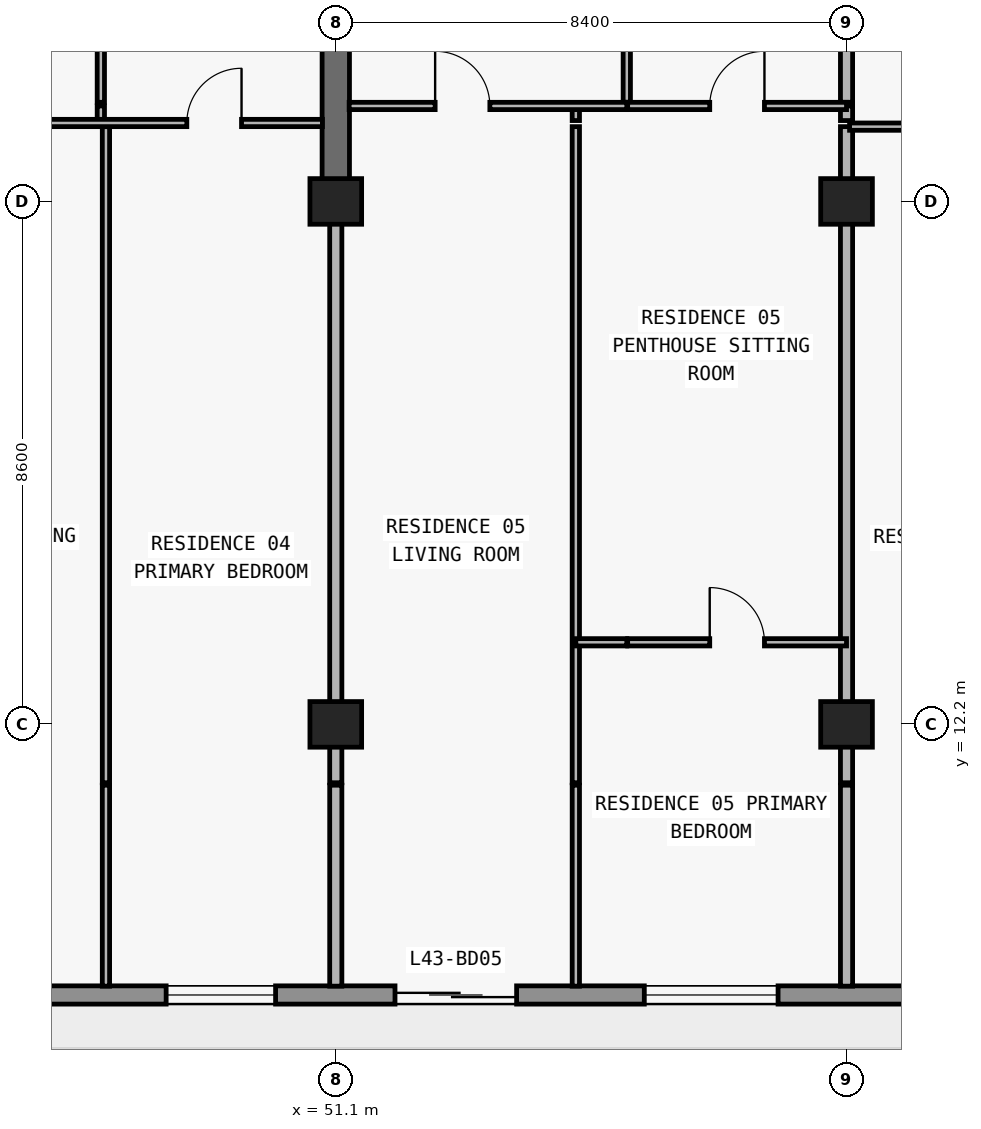
"""IFC4 building model, lengths in metres.
Left out: names, types, materials, properties, quantities, classifications, styles, units other than length and angle.
Written with IfcOpenShell. Run it as: python <this file> out.ifc"""

import sys

from ifc_helpers import new_model, si_unit, direction, frame, frame_2d, origin, origin_2d, place, context, subcontext, project, spatial, rectangle, extrude, element, fill, save


model = new_model("IFC4")
c1 = context("Model", 3, precision=1e-05, world=origin(), true_north=direction((0.0, 1.0)))
c2 = subcontext(c1, "Body", "Model", "MODEL_VIEW")
j1 = project(units=[si_unit("LENGTHUNIT", "METRE"), si_unit("PLANEANGLEUNIT", "RADIAN")], contexts=[c1])
p1 = place(None, origin())
s1 = spatial("IfcSite", under=j1, at=p1, CompositionType="ELEMENT")
p2 = place(p1, origin())
s2 = spatial("IfcBuilding", under=s1, at=p2, CompositionType="ELEMENT")
p3 = place(p2, frame((0.0, 0.0, 157.2)))
s3 = spatial("IfcBuildingStorey", under=s2, at=p3, CompositionType="ELEMENT", Elevation=157.2)
for number, where, z_axis, x_axis in (
    (1, (51.1, 12.2, 0.0), (0.0, 0.0, 1.0), (1.0, 0.0, 0.0)),
    (2, (59.5, 12.2, 0.0), (0.0, 0.0, 1.0), (1.0, 0.0, 0.0)),
    (3, (51.1, 20.8, 0.0), (0.0, 0.0, 1.0), (1.0, 0.0, 0.0)),
    (4, (59.5, 20.8, 0.0), (0.0, 0.0, 1.0), (1.0, 0.0, 0.0)),
):
    element("IfcColumn", number, at=place(p3, frame(where, z_axis=z_axis, x_axis=x_axis)), inside=s3, PredefinedType="COLUMN", context=c2, shape_type="SweptSolid", body=[
        extrude(rectangle(XDim=0.85, YDim=0.75, at=origin_2d()), origin(), (0.0, 0.0, 1.0), 3.05),
    ])
p4 = place(p3, frame((51.1, 20.8, 0.0), z_axis=(0.0, 0.0, 1.0), x_axis=(0.0, 1.0, 0.0)))
e5 = element("IfcWall", 5, at=p4, inside=s3, PredefinedType="SHEAR", context=c2, shape_type="SweptSolid", body=[
    extrude(rectangle(XDim=8.6, YDim=0.45, at=frame_2d((4.3, 0.0))), origin(), (0.0, 0.0, 1.0), 3.05),
])
p5 = place(p3, frame((67.7, 7.75, 0.0), z_axis=(0.0, 0.0, 1.0), x_axis=(-1.0, 0.0, 0.0)))
e6 = element("IfcWall", 6, at=p5, inside=s3, PredefinedType="STANDARD", context=c2, shape_type="SweptSolid", body=[
    extrude(rectangle(XDim=57.6, YDim=0.3, at=frame_2d((28.8, 0.0))), origin(), (0.0, 0.0, 1.0), 3.05),
])
p6 = place(p5, frame((54.673, 0.0, 0.0)))
e7 = element("IfcOpeningElement", 7, at=p6, cuts=e6, PredefinedType="OPENING", context=c2, shape_type="SweptSolid", body=[
    extrude(rectangle(XDim=2.0, YDim=2.3, at=frame_2d((1.0, 1.15))), frame((0.0, 0.16, 0.0), z_axis=(0.0, -1.0, 0.0), x_axis=(1.0, 0.0, 0.0)), (0.0, 0.0, 1.0), 0.32),
])
p7 = place(p5, frame((50.473, 0.0, 0.85)))
e8 = element("IfcOpeningElement", 8, at=p7, cuts=e6, PredefinedType="OPENING", context=c2, shape_type="SweptSolid", body=[
    extrude(rectangle(XDim=2.2, YDim=1.55, at=frame_2d((1.1, 0.775))), frame((0.0, 0.16, 0.0), z_axis=(0.0, -1.0, 0.0), x_axis=(1.0, 0.0, 0.0)), (0.0, 0.0, 1.0), 0.32),
])
p8 = place(p5, frame((46.09, 0.0, 0.0)))
e9 = element("IfcOpeningElement", 9, at=p8, cuts=e6, PredefinedType="OPENING", context=c2, shape_type="SweptSolid", body=[
    extrude(rectangle(XDim=2.0, YDim=2.3, at=frame_2d((1.0, 1.15))), frame((0.0, 0.16, 0.0), z_axis=(0.0, -1.0, 0.0), x_axis=(1.0, 0.0, 0.0)), (0.0, 0.0, 1.0), 0.32),
])
p9 = place(p5, frame((41.99, 0.0, 0.85)))
e10 = element("IfcOpeningElement", 10, at=p9, cuts=e6, PredefinedType="OPENING", context=c2, shape_type="SweptSolid", body=[
    extrude(rectangle(XDim=1.8, YDim=1.55, at=frame_2d((0.9, 0.775))), frame((0.0, 0.16, 0.0), z_axis=(0.0, -1.0, 0.0), x_axis=(1.0, 0.0, 0.0)), (0.0, 0.0, 1.0), 0.32),
])
p10 = place(p5, frame((38.09, 0.0, 0.0)))
e11 = element("IfcOpeningElement", 11, at=p10, cuts=e6, PredefinedType="OPENING", context=c2, shape_type="SweptSolid", body=[
    extrude(rectangle(XDim=2.0, YDim=2.3, at=frame_2d((1.0, 1.15))), frame((0.0, 0.16, 0.0), z_axis=(0.0, -1.0, 0.0), x_axis=(1.0, 0.0, 0.0)), (0.0, 0.0, 1.0), 0.32),
])
p11 = place(p5, frame((33.41, 0.0, 0.65)))
e12 = element("IfcOpeningElement", 12, at=p11, cuts=e6, PredefinedType="OPENING", context=c2, shape_type="SweptSolid", body=[
    extrude(rectangle(XDim=2.6, YDim=1.85, at=frame_2d((1.3, 0.925))), frame((0.0, 0.16, 0.0), z_axis=(0.0, -1.0, 0.0), x_axis=(1.0, 0.0, 0.0)), (0.0, 0.0, 1.0), 0.32),
])
p12 = place(p5, frame((27.7, 0.0, 0.85)))
e13 = element("IfcOpeningElement", 13, at=p12, cuts=e6, PredefinedType="OPENING", context=c2, shape_type="SweptSolid", body=[
    extrude(rectangle(XDim=2.2, YDim=1.55, at=frame_2d((1.1, 0.775))), frame((0.0, 0.16, 0.0), z_axis=(0.0, -1.0, 0.0), x_axis=(1.0, 0.0, 0.0)), (0.0, 0.0, 1.0), 0.32),
])
p13 = place(p5, frame((21.69, 0.0, 0.0)))
e14 = element("IfcOpeningElement", 14, at=p13, cuts=e6, PredefinedType="OPENING", context=c2, shape_type="SweptSolid", body=[
    extrude(rectangle(XDim=2.0, YDim=2.3, at=frame_2d((1.0, 1.15))), frame((0.0, 0.16, 0.0), z_axis=(0.0, -1.0, 0.0), x_axis=(1.0, 0.0, 0.0)), (0.0, 0.0, 1.0), 0.32),
])
p14 = place(p5, frame((17.59, 0.0, 0.85)))
e15 = element("IfcOpeningElement", 15, at=p14, cuts=e6, PredefinedType="OPENING", context=c2, shape_type="SweptSolid", body=[
    extrude(rectangle(XDim=1.8, YDim=1.55, at=frame_2d((0.9, 0.775))), frame((0.0, 0.16, 0.0), z_axis=(0.0, -1.0, 0.0), x_axis=(1.0, 0.0, 0.0)), (0.0, 0.0, 1.0), 0.32),
])
p15 = place(p5, frame((13.626, 0.0, 0.0)))
e16 = element("IfcOpeningElement", 16, at=p15, cuts=e6, PredefinedType="OPENING", context=c2, shape_type="SweptSolid", body=[
    extrude(rectangle(XDim=2.0, YDim=2.3, at=frame_2d((1.0, 1.15))), frame((0.0, 0.16, 0.0), z_axis=(0.0, -1.0, 0.0), x_axis=(1.0, 0.0, 0.0)), (0.0, 0.0, 1.0), 0.32),
])
p16 = place(p5, frame((9.326, 0.0, 0.85)))
e17 = element("IfcOpeningElement", 17, at=p16, cuts=e6, PredefinedType="OPENING", context=c2, shape_type="SweptSolid", body=[
    extrude(rectangle(XDim=2.2, YDim=1.55, at=frame_2d((1.1, 0.775))), frame((0.0, 0.16, 0.0), z_axis=(0.0, -1.0, 0.0), x_axis=(1.0, 0.0, 0.0)), (0.0, 0.0, 1.0), 0.32),
])
p17 = place(p5, frame((4.945, 0.0, 0.0)))
e18 = element("IfcOpeningElement", 18, at=p17, cuts=e6, PredefinedType="OPENING", context=c2, shape_type="SweptSolid", body=[
    extrude(rectangle(XDim=2.0, YDim=2.3, at=frame_2d((1.0, 1.15))), frame((0.0, 0.16, 0.0), z_axis=(0.0, -1.0, 0.0), x_axis=(1.0, 0.0, 0.0)), (0.0, 0.0, 1.0), 0.32),
])
p18 = place(p5, frame((0.945, 0.0, 0.85)))
e19 = element("IfcOpeningElement", 19, at=p18, cuts=e6, PredefinedType="OPENING", context=c2, shape_type="SweptSolid", body=[
    extrude(rectangle(XDim=1.8, YDim=1.55, at=frame_2d((0.9, 0.775))), frame((0.0, 0.16, 0.0), z_axis=(0.0, -1.0, 0.0), x_axis=(1.0, 0.0, 0.0)), (0.0, 0.0, 1.0), 0.32),
])
p19 = place(p3, frame((47.236, 22.13, 0.0), z_axis=(0.0, 0.0, 1.0), x_axis=(0.0, 1.0, 0.0)))
e20 = element("IfcWall", 20, at=p19, inside=s3, PredefinedType="PARTITIONING", context=c2, shape_type="SweptSolid", body=[
    extrude(rectangle(XDim=0.24, YDim=0.12, at=frame_2d((0.12, 0.0))), origin(), (0.0, 0.0, 1.0), 3.05),
])
p20 = place(p3, frame((47.236, 22.43, 0.0), z_axis=(0.0, 0.0, 1.0), x_axis=(0.0, 1.0, 0.0)))
e21 = element("IfcWall", 21, at=p20, inside=s3, PredefinedType="PARTITIONING", context=c2, shape_type="SweptSolid", body=[
    extrude(rectangle(XDim=4.75, YDim=0.12, at=frame_2d((2.375, 0.0))), origin(), (0.0, 0.0, 1.0), 3.05),
])
p21 = place(p20, frame((1.925, 0.0, 0.0)))
e22 = element("IfcOpeningElement", 22, at=p21, cuts=e21, PredefinedType="OPENING", context=c2, shape_type="SweptSolid", body=[
    extrude(rectangle(XDim=0.9, YDim=2.15, at=frame_2d((0.45, 1.075))), frame((0.0, 0.07, 0.0), z_axis=(0.0, -1.0, 0.0), x_axis=(1.0, 0.0, 0.0)), (0.0, 0.0, 1.0), 0.14),
])
p22 = place(p3, frame((47.32, 7.895, 0.0), z_axis=(0.0, 0.0, 1.0), x_axis=(0.0, 1.0, 0.0)))
e23 = element("IfcWall", 23, at=p22, inside=s3, PredefinedType="PARTITIONING", context=c2, shape_type="SweptSolid", body=[
    extrude(rectangle(XDim=3.305, YDim=0.12, at=frame_2d((1.652, 0.0))), origin(), (0.0, 0.0, 1.0), 3.05),
])
p23 = place(p3, frame((47.32, 11.24, 0.0), z_axis=(0.0, 0.0, 1.0), x_axis=(0.0, 1.0, 0.0)))
e24 = element("IfcWall", 24, at=p23, inside=s3, PredefinedType="PARTITIONING", context=c2, shape_type="SweptSolid", body=[
    extrude(rectangle(XDim=10.79, YDim=0.12, at=frame_2d((5.395, 0.0))), origin(), (0.0, 0.0, 1.0), 3.05),
])
p24 = place(p3, frame((51.1, 7.895, 0.0), z_axis=(0.0, 0.0, 1.0), x_axis=(0.0, 1.0, 0.0)))
e25 = element("IfcWall", 25, at=p24, inside=s3, PredefinedType="PARTITIONING", context=c2, shape_type="SweptSolid", body=[
    extrude(rectangle(XDim=3.305, YDim=0.2, at=frame_2d((1.652, 0.0))), origin(), (0.0, 0.0, 1.0), 3.05),
])
p25 = place(p3, frame((51.1, 11.24, 0.0), z_axis=(0.0, 0.0, 1.0), x_axis=(0.0, 1.0, 0.0)))
e26 = element("IfcWall", 26, at=p25, inside=s3, PredefinedType="PARTITIONING", context=c2, shape_type="SweptSolid", body=[
    extrude(rectangle(XDim=9.555, YDim=0.2, at=frame_2d((4.777, 0.0))), origin(), (0.0, 0.0, 1.0), 2.263),
])
p26 = place(p3, frame((55.048, 7.895, 0.0), z_axis=(0.0, 0.0, 1.0), x_axis=(0.0, 1.0, 0.0)))
e27 = element("IfcWall", 27, at=p26, inside=s3, PredefinedType="PARTITIONING", context=c2, shape_type="SweptSolid", body=[
    extrude(rectangle(XDim=3.305, YDim=0.12, at=frame_2d((1.652, 0.0))), origin(), (0.0, 0.0, 1.0), 3.05),
])
p27 = place(p3, frame((55.048, 11.24, 0.0), z_axis=(0.0, 0.0, 1.0), x_axis=(0.0, 1.0, 0.0)))
e28 = element("IfcWall", 28, at=p27, inside=s3, PredefinedType="PARTITIONING", context=c2, shape_type="SweptSolid", body=[
    extrude(rectangle(XDim=10.79, YDim=0.12, at=frame_2d((5.395, 0.0))), origin(), (0.0, 0.0, 1.0), 3.05),
])
p28 = place(p3, frame((55.048, 22.13, 0.0), z_axis=(0.0, 0.0, 1.0), x_axis=(0.0, 1.0, 0.0)))
e29 = element("IfcWall", 29, at=p28, inside=s3, PredefinedType="PARTITIONING", context=c2, shape_type="SweptSolid", body=[
    extrude(rectangle(XDim=0.24, YDim=0.12, at=frame_2d((0.12, 0.0))), origin(), (0.0, 0.0, 1.0), 3.05),
])
p29 = place(p3, frame((55.886, 22.43, 0.0), z_axis=(0.0, 0.0, 1.0), x_axis=(0.0, 1.0, 0.0)))
e30 = element("IfcWall", 30, at=p29, inside=s3, PredefinedType="PARTITIONING", context=c2, shape_type="SweptSolid", body=[
    extrude(rectangle(XDim=4.75, YDim=0.12, at=frame_2d((2.375, 0.0))), origin(), (0.0, 0.0, 1.0), 3.05),
])
p30 = place(p29, frame((1.925, 0.0, 0.0)))
e31 = element("IfcOpeningElement", 31, at=p30, cuts=e30, PredefinedType="OPENING", context=c2, shape_type="SweptSolid", body=[
    extrude(rectangle(XDim=0.9, YDim=2.15, at=frame_2d((0.45, 1.075))), frame((0.0, 0.07, 0.0), z_axis=(0.0, -1.0, 0.0), x_axis=(1.0, 0.0, 0.0)), (0.0, 0.0, 1.0), 0.14),
])
p31 = place(p3, frame((59.5, 7.895, 0.0), z_axis=(0.0, 0.0, 1.0), x_axis=(0.0, 1.0, 0.0)))
e32 = element("IfcWall", 32, at=p31, inside=s3, PredefinedType="PARTITIONING", context=c2, shape_type="SweptSolid", body=[
    extrude(rectangle(XDim=3.305, YDim=0.2, at=frame_2d((1.652, 0.0))), origin(), (0.0, 0.0, 1.0), 3.05),
])
p32 = place(p3, frame((59.5, 11.24, 0.0), z_axis=(0.0, 0.0, 1.0), x_axis=(0.0, 1.0, 0.0)))
e33 = element("IfcWall", 33, at=p32, inside=s3, PredefinedType="PARTITIONING", context=c2, shape_type="SweptSolid", body=[
    extrude(rectangle(XDim=10.79, YDim=0.2, at=frame_2d((5.395, 0.0))), origin(), (0.0, 0.0, 1.0), 2.263),
])
p33 = place(p3, frame((59.5, 22.13, 0.0), z_axis=(0.0, 0.0, 1.0), x_axis=(0.0, 1.0, 0.0)))
e34 = element("IfcWall", 34, at=p33, inside=s3, PredefinedType="PARTITIONING", context=c2, shape_type="SweptSolid", body=[
    extrude(rectangle(XDim=0.24, YDim=0.2, at=frame_2d((0.12, 0.0))), origin(), (0.0, 0.0, 1.0), 2.263),
])
p34 = place(p3, frame((59.5, 22.43, 0.0), z_axis=(0.0, 0.0, 1.0), x_axis=(0.0, 1.0, 0.0)))
e35 = element("IfcWall", 35, at=p34, inside=s3, PredefinedType="PARTITIONING", context=c2, shape_type="SweptSolid", body=[
    extrude(rectangle(XDim=4.75, YDim=0.2, at=frame_2d((2.375, 0.0))), origin(), (0.0, 0.0, 1.0), 2.263),
])
p35 = place(p3, frame((55.048, 13.55, 0.0), z_axis=(0.0, 0.0, 1.0), x_axis=(1.0, 0.0, 0.0)))
e36 = element("IfcWall", 36, at=p35, inside=s3, PredefinedType="PARTITIONING", context=c2, shape_type="SweptSolid", body=[
    extrude(rectangle(XDim=0.838, YDim=0.12, at=frame_2d((0.419, 0.0))), origin(), (0.0, 0.0, 1.0), 3.05),
])
p36 = place(p3, frame((55.9, 13.55, 0.0), z_axis=(0.0, 0.0, 1.0), x_axis=(1.0, 0.0, 0.0)))
e37 = element("IfcWall", 37, at=p36, inside=s3, PredefinedType="PARTITIONING", context=c2, shape_type="SweptSolid", body=[
    extrude(rectangle(XDim=3.6, YDim=0.12, at=frame_2d((1.8, 0.0))), origin(), (0.0, 0.0, 1.0), 3.05),
])
p37 = place(p36, frame((1.35, 0.0, 0.0)))
e38 = element("IfcOpeningElement", 38, at=p37, cuts=e37, PredefinedType="OPENING", context=c2, shape_type="SweptSolid", body=[
    extrude(rectangle(XDim=0.9, YDim=2.15, at=frame_2d((0.45, 1.075))), frame((0.0, 0.07, 0.0), z_axis=(0.0, -1.0, 0.0), x_axis=(1.0, 0.0, 0.0)), (0.0, 0.0, 1.0), 0.14),
])
p38 = place(p3, frame((59.55, 22.03, 0.0), z_axis=(0.0, 0.0, 1.0), x_axis=(1.0, 0.0, 0.0)))
e39 = element("IfcWall", 39, at=p38, inside=s3, PredefinedType="PARTITIONING", context=c2, shape_type="SweptSolid", body=[
    extrude(rectangle(XDim=8.15, YDim=0.12, at=frame_2d((4.075, 0.0))), origin(), (0.0, 0.0, 1.0), 3.05),
])
p39 = place(p38, frame((1.614, 0.0, 0.0)))
e40 = element("IfcOpeningElement", 40, at=p39, cuts=e39, PredefinedType="OPENING", context=c2, shape_type="SweptSolid", body=[
    extrude(rectangle(XDim=0.9, YDim=2.15, at=frame_2d((0.45, 1.075))), frame((0.0, 0.07, 0.0), z_axis=(0.0, -1.0, 0.0), x_axis=(1.0, 0.0, 0.0)), (0.0, 0.0, 1.0), 0.14),
])
p40 = place(p38, frame((5.855, 0.0, 0.0)))
e41 = element("IfcOpeningElement", 41, at=p40, cuts=e39, PredefinedType="OPENING", context=c2, shape_type="SweptSolid", body=[
    extrude(rectangle(XDim=0.9, YDim=2.15, at=frame_2d((0.45, 1.075))), frame((0.0, 0.07, 0.0), z_axis=(0.0, -1.0, 0.0), x_axis=(1.0, 0.0, 0.0)), (0.0, 0.0, 1.0), 0.14),
])
p41 = place(p3, frame((42.7, 22.09, 0.0), z_axis=(0.0, 0.0, 1.0), x_axis=(1.0, 0.0, 0.0)))
e42 = element("IfcWall", 42, at=p41, inside=s3, PredefinedType="PARTITIONING", context=c2, shape_type="SweptSolid", body=[
    extrude(rectangle(XDim=8.18, YDim=0.12, at=frame_2d((4.09, 0.0))), origin(), (0.0, 0.0, 1.0), 3.05),
])
p42 = place(p41, frame((1.818, 0.0, 0.0)))
e43 = element("IfcOpeningElement", 43, at=p42, cuts=e42, PredefinedType="OPENING", context=c2, shape_type="SweptSolid", body=[
    extrude(rectangle(XDim=0.9, YDim=2.15, at=frame_2d((0.45, 1.075))), frame((0.0, 0.07, 0.0), z_axis=(0.0, -1.0, 0.0), x_axis=(1.0, 0.0, 0.0)), (0.0, 0.0, 1.0), 0.14),
])
p43 = place(p41, frame((5.95, 0.0, 0.0)))
e44 = element("IfcOpeningElement", 44, at=p43, cuts=e42, PredefinedType="OPENING", context=c2, shape_type="SweptSolid", body=[
    extrude(rectangle(XDim=0.9, YDim=2.15, at=frame_2d((0.45, 1.075))), frame((0.0, 0.07, 0.0), z_axis=(0.0, -1.0, 0.0), x_axis=(1.0, 0.0, 0.0)), (0.0, 0.0, 1.0), 0.14),
])
p44 = place(p3, frame((51.32, 22.37, 0.0), z_axis=(0.0, 0.0, 1.0), x_axis=(1.0, 0.0, 0.0)))
e45 = element("IfcWall", 45, at=p44, inside=s3, PredefinedType="PARTITIONING", context=c2, shape_type="SweptSolid", body=[
    extrude(rectangle(XDim=4.566, YDim=0.12, at=frame_2d((2.283, 0.0))), origin(), (0.0, 0.0, 1.0), 3.05),
])
p45 = place(p44, frame((1.414, 0.0, 0.0)))
e46 = element("IfcOpeningElement", 46, at=p45, cuts=e45, PredefinedType="OPENING", context=c2, shape_type="SweptSolid", body=[
    extrude(rectangle(XDim=0.9, YDim=2.15, at=frame_2d((0.45, 1.075))), frame((0.0, 0.07, 0.0), z_axis=(0.0, -1.0, 0.0), x_axis=(1.0, 0.0, 0.0)), (0.0, 0.0, 1.0), 0.14),
])
p46 = place(p3, frame((55.9, 22.37, 0.0), z_axis=(0.0, 0.0, 1.0), x_axis=(1.0, 0.0, 0.0)))
e47 = element("IfcWall", 47, at=p46, inside=s3, PredefinedType="PARTITIONING", context=c2, shape_type="SweptSolid", body=[
    extrude(rectangle(XDim=3.6, YDim=0.12, at=frame_2d((1.8, 0.0))), origin(), (0.0, 0.0, 1.0), 3.05),
])
p47 = place(p46, frame((1.35, 0.0, 0.0)))
e48 = element("IfcOpeningElement", 48, at=p47, cuts=e47, PredefinedType="OPENING", context=c2, shape_type="SweptSolid", body=[
    extrude(rectangle(XDim=0.9, YDim=2.15, at=frame_2d((0.45, 1.075))), frame((0.0, 0.07, 0.0), z_axis=(0.0, -1.0, 0.0), x_axis=(1.0, 0.0, 0.0)), (0.0, 0.0, 1.0), 0.14),
])
p48 = place(p14, origin())
e49 = element("IfcWindow", 49, at=p48, inside=s3, PartitioningType="SINGLE_PANEL", PredefinedType="WINDOW", context=c2, shape_type="SweptSolid", body=[
    extrude(rectangle(XDim=1.8, YDim=1.55, at=frame_2d((0.9, 0.775))), frame((0.0, 0.03, 0.0), z_axis=(0.0, -1.0, 0.0), x_axis=(1.0, 0.0, 0.0)), (0.0, 0.0, 1.0), 0.06),
])
fill(e15, e49)
p49 = place(p15, origin())
e50 = element("IfcDoor", 50, at=p49, inside=s3, OperationType="DOUBLE_DOOR_SLIDING", PredefinedType="DOOR", context=c2, shape_type="SweptSolid", body=[
    extrude(rectangle(XDim=2.0, YDim=2.3, at=frame_2d((1.0, 1.15))), frame((0.0, 0.025, 0.0), z_axis=(0.0, -1.0, 0.0), x_axis=(1.0, 0.0, 0.0)), (0.0, 0.0, 1.0), 0.05),
])
fill(e16, e50)
p50 = place(p16, origin())
e51 = element("IfcWindow", 51, at=p50, inside=s3, PartitioningType="SINGLE_PANEL", PredefinedType="WINDOW", context=c2, shape_type="SweptSolid", body=[
    extrude(rectangle(XDim=2.2, YDim=1.55, at=frame_2d((1.1, 0.775))), frame((0.0, 0.03, 0.0), z_axis=(0.0, -1.0, 0.0), x_axis=(1.0, 0.0, 0.0)), (0.0, 0.0, 1.0), 0.06),
])
fill(e17, e51)
p51 = place(p43, origin())
e52 = element("IfcDoor", 52, at=p51, inside=s3, OperationType="SINGLE_SWING_RIGHT", PredefinedType="DOOR", context=c2, shape_type="SweptSolid", body=[
    extrude(rectangle(XDim=0.9, YDim=2.15, at=frame_2d((0.45, 1.075))), frame((0.0, 0.025, 0.0), z_axis=(0.0, -1.0, 0.0), x_axis=(1.0, 0.0, 0.0)), (0.0, 0.0, 1.0), 0.05),
])
fill(e44, e52)
p52 = place(p45, origin())
e53 = element("IfcDoor", 53, at=p52, inside=s3, OperationType="SINGLE_SWING_LEFT", PredefinedType="DOOR", context=c2, shape_type="SweptSolid", body=[
    extrude(rectangle(XDim=0.9, YDim=2.15, at=frame_2d((0.45, 1.075))), frame((0.0, 0.025, 0.0), z_axis=(0.0, -1.0, 0.0), x_axis=(1.0, 0.0, 0.0)), (0.0, 0.0, 1.0), 0.05),
])
fill(e46, e53)
p53 = place(p47, origin())
e54 = element("IfcDoor", 54, at=p53, inside=s3, OperationType="SINGLE_SWING_RIGHT", PredefinedType="DOOR", context=c2, shape_type="SweptSolid", body=[
    extrude(rectangle(XDim=0.9, YDim=2.15, at=frame_2d((0.45, 1.075))), frame((0.0, 0.025, 0.0), z_axis=(0.0, -1.0, 0.0), x_axis=(1.0, 0.0, 0.0)), (0.0, 0.0, 1.0), 0.05),
])
fill(e48, e54)
p54 = place(p37, origin())
e55 = element("IfcDoor", 55, at=p54, inside=s3, OperationType="SINGLE_SWING_LEFT", PredefinedType="DOOR", context=c2, shape_type="SweptSolid", body=[
    extrude(rectangle(XDim=0.9, YDim=2.15, at=frame_2d((0.45, 1.075))), frame((0.0, 0.025, 0.0), z_axis=(0.0, -1.0, 0.0), x_axis=(1.0, 0.0, 0.0)), (0.0, 0.0, 1.0), 0.05),
])
fill(e38, e55)
save(model, sys.argv[1])
